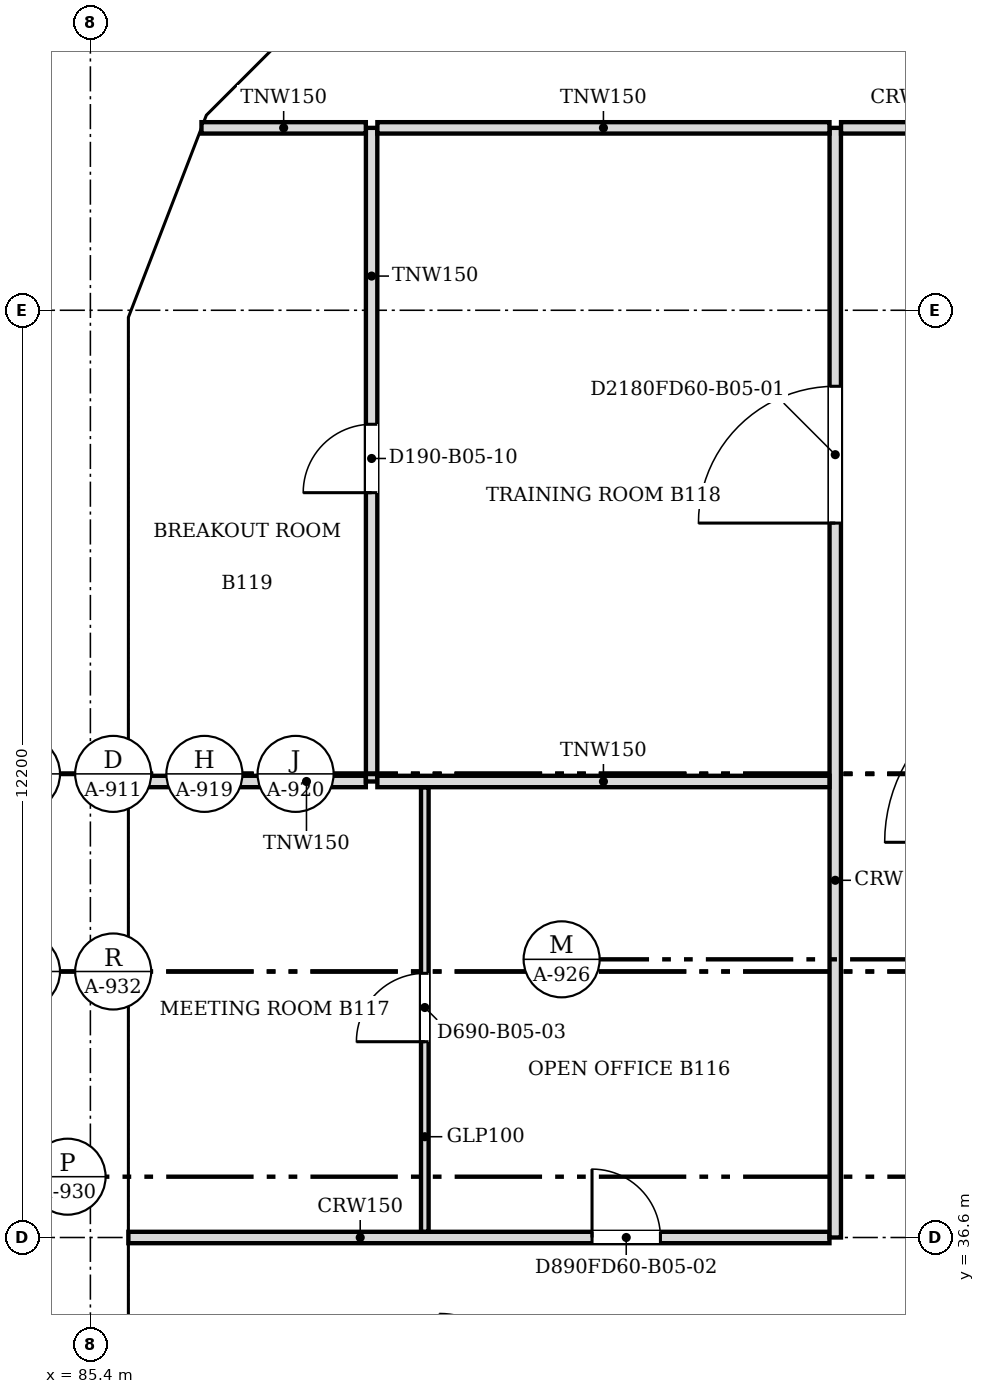
"""IFC4 building model, lengths in metres.
Left out: names, types, materials, properties, quantities, classifications, styles, units other than length and angle.
Written with IfcOpenShell. Run it as: python <this file> out.ifc"""

import sys

from ifc_helpers import new_model, si_unit, direction, frame, frame_2d, origin, place, context, subcontext, project, spatial, polyline, rectangle, outline, extrude, faceted_brep, source, transform, mapped, element, fill, save


model = new_model("IFC4")
c1 = context("Model", 3, precision=1e-05, world=origin(), true_north=direction((0.0, 1.0)))
c2 = subcontext(c1, "Body", "Model", "MODEL_VIEW")
j1 = project(units=[si_unit("LENGTHUNIT", "METRE"), si_unit("PLANEANGLEUNIT", "RADIAN")], contexts=[c1])
p1 = place(None, origin())
s1 = spatial("IfcSite", under=j1, at=p1, CompositionType="ELEMENT")
p2 = place(p1, origin())
s2 = spatial("IfcBuilding", under=s1, at=p2, CompositionType="ELEMENT")
p3 = place(p2, frame((0.0, 0.0, 52.4)))
s3 = spatial("IfcBuildingStorey", under=s2, at=p3, CompositionType="ELEMENT", Elevation=52.4)
m1 = source(origin(), c2, "Body", "Brep", [
    faceted_brep([(0.053, -0.25, 0.0), (2.997, -0.25, 3.8), (0.053, -0.25, 7.6), (0.0, -0.25, 7.532), (0.0, -0.25, 0.068), (0.106, 0.25, 7.531), (2.944, 0.25, 3.868), (2.944, 0.25, 3.732), (0.106, 0.25, 0.068), (2.997, 0.0, 3.8), (0.053, 0.0, 0.0), (0.053, 0.0, 7.6)], [[[0, 1, 2, 3, 4]], [[5, 6, 7, 8]], [[8, 7, 9, 1, 0, 10]], [[6, 5, 11, 2, 1, 9]], [[3, 2, 11]], [[10, 0, 4]], [[8, 10, 4, 3, 11, 5]], [[9, 7, 6]]]),
])
p4 = place(p3, frame((88.831, 53.625, -3.8), z_axis=(0.0, 0.0, 1.0), x_axis=(-0.707147509625, -0.707066050402, 0.0)))
e1 = element("IfcWall", 1, at=p4, inside=s3, PredefinedType="SOLIDWALL", context=c2, shape_type="MappedRepresentation", body=[
    mapped(m1, transform((0.0, 0.0, 0.0), scale=1.0)),
])
m2 = source(origin(), c2, "Body", "SweptSolid", [
    extrude(outline(polyline([(0.253, 0.666), (2.681, 3.8), (0.253, 6.934), (0.253, 0.666)])), frame((0.0, 0.26, 0.0), z_axis=(0.0, -1.0, 0.0), x_axis=(1.0, 0.0, 0.0)), (0.0, 0.0, 1.0), 0.52),
])
p5 = place(p4, origin())
e2 = element("IfcOpeningElement", 2, at=p5, cuts=e1, PredefinedType="OPENING", context=c2, shape_type="MappedRepresentation", body=[
    mapped(m2, transform((0.0, 0.0, 0.0), scale=1.0)),
])
m3 = source(origin(), c2, "Body", "Brep", [
    faceted_brep([(2.95, -0.25, 0.0), (2.997, -0.25, 0.059), (2.997, -0.25, 7.541), (2.95, -0.25, 7.6), (0.0, -0.25, 3.8), (0.053, 0.25, 3.868), (2.904, 0.25, 7.54), (2.904, 0.25, 0.06), (0.053, 0.25, 3.732), (2.95, 0.0, 0.0), (2.95, 0.0, 7.6), (0.0, 0.0, 3.8)], [[[0, 1, 2, 3, 4]], [[5, 6, 7, 8]], [[1, 0, 9]], [[10, 3, 2]], [[6, 5, 11, 4, 3, 10]], [[8, 7, 9, 0, 4, 11]], [[8, 11, 5]], [[1, 9, 7, 6, 10, 2]]]),
])
p6 = place(p3, frame((86.712, 51.506, -3.8), z_axis=(0.0, 0.0, 1.0), x_axis=(-0.359874094142, -0.933000876937, 0.0)))
e3 = element("IfcWall", 3, at=p6, inside=s3, PredefinedType="SOLIDWALL", context=c2, shape_type="MappedRepresentation", body=[
    mapped(m3, transform((0.0, 0.0, 0.0), scale=1.0)),
])
m4 = source(origin(), c2, "Body", "SweptSolid", [
    extrude(outline(polyline([(2.75, 6.935), (0.316, 3.8), (2.75, 0.665), (2.75, 6.935)])), frame((0.0, 0.26, 0.0), z_axis=(0.0, -1.0, 0.0), x_axis=(1.0, 0.0, 0.0)), (0.0, 0.0, 1.0), 0.52),
])
p7 = place(p6, origin())
e4 = element("IfcOpeningElement", 4, at=p7, cuts=e3, PredefinedType="OPENING", context=c2, shape_type="MappedRepresentation", body=[
    mapped(m4, transform((0.0, 0.0, 0.0), scale=1.0)),
])
m5 = source(origin(), c2, "Body", "Brep", [
    faceted_brep([(0.047, -0.25, 0.0), (3.05, -0.25, 3.8), (0.047, -0.25, 7.6), (0.0, -0.25, 7.54), (0.0, -0.25, 0.06), (0.093, 0.25, 7.541), (3.05, 0.25, 3.8), (0.093, 0.25, 0.059), (0.047, 0.0, 0.0), (0.047, 0.0, 7.6)], [[[0, 1, 2, 3, 4]], [[5, 6, 7]], [[7, 6, 1, 0, 8]], [[6, 5, 9, 2, 1]], [[3, 2, 9]], [[8, 0, 4]], [[7, 8, 4, 3, 9, 5]]]),
])
p8 = place(p3, frame((85.65, 48.8, -3.8), z_axis=(0.0, 0.0, 1.0), x_axis=(0.0, -1.0, 0.0)))
e5 = element("IfcWall", 5, at=p8, inside=s3, PredefinedType="SOLIDWALL", context=c2, shape_type="MappedRepresentation", body=[
    mapped(m5, transform((0.0, 0.0, 0.0), scale=1.0)),
])
m6 = source(origin(), c2, "Body", "SweptSolid", [
    extrude(outline(polyline([(0.247, 0.656), (2.731, 3.8), (0.247, 6.944), (0.247, 0.656)])), frame((0.0, 0.26, 0.0), z_axis=(0.0, -1.0, 0.0), x_axis=(1.0, 0.0, 0.0)), (0.0, 0.0, 1.0), 0.52),
])
p9 = place(p8, origin())
e6 = element("IfcOpeningElement", 6, at=p9, cuts=e5, PredefinedType="OPENING", context=c2, shape_type="MappedRepresentation", body=[
    mapped(m6, transform((0.0, 0.0, 0.0), scale=1.0)),
])
m7 = source(origin(), c2, "Body", "SweptSolid", [
    extrude(outline(polyline([(3.05, 0.0), (6.1, 3.8), (3.05, 7.6), (0.0, 3.8), (3.05, 0.0)])), frame((0.0, 0.25, 0.0), z_axis=(0.0, -1.0, 0.0), x_axis=(1.0, 0.0, 0.0)), (0.0, 0.0, 1.0), 0.5),
])
p10 = place(p3, frame((85.65, 45.75, -3.8), z_axis=(0.0, 0.0, 1.0), x_axis=(0.0, -1.0, 0.0)))
e7 = element("IfcWall", 7, at=p10, inside=s3, PredefinedType="SOLIDWALL", context=c2, shape_type="MappedRepresentation", body=[
    mapped(m7, transform((0.0, 0.0, 0.0), scale=1.0)),
])
m8 = source(origin(), c2, "Body", "SweptSolid", [
    extrude(outline(polyline([(3.05, 0.399), (5.78, 3.8), (3.05, 7.2), (0.321, 3.8), (3.05, 0.399)])), frame((0.0, 0.26, 0.0), z_axis=(0.0, -1.0, 0.0), x_axis=(1.0, 0.0, 0.0)), (0.0, 0.0, 1.0), 0.52),
])
p11 = place(p10, origin())
e8 = element("IfcOpeningElement", 8, at=p11, cuts=e7, PredefinedType="OPENING", context=c2, shape_type="MappedRepresentation", body=[
    mapped(m8, transform((0.0, 0.0, 0.0), scale=1.0)),
])
m9 = source(origin(), c2, "Body", "Brep", [
    faceted_brep([(3.05, -0.25, 0.0), (6.1, -0.25, 3.8), (6.1, -0.25, 3.8), (3.05, -0.25, 7.6), (0.0, -0.25, 3.8), (0.0, 0.25, 3.8), (3.05, 0.25, 7.6), (6.1, 0.25, 3.8), (6.1, 0.25, 3.8), (3.05, 0.25, 0.0)], [[[0, 1, 2, 3, 4]], [[5, 6, 7, 8, 9]], [[9, 8, 1, 0]], [[7, 6, 3, 2]], [[6, 5, 4, 3]], [[5, 9, 0, 4]], [[1, 8, 7, 2]]]),
])
p12 = place(p3, frame((85.65, 39.65, -3.8), z_axis=(0.0, 0.0, 1.0), x_axis=(0.0, -1.0, 0.0)))
e9 = element("IfcWall", 9, at=p12, inside=s3, PredefinedType="SOLIDWALL", context=c2, shape_type="MappedRepresentation", body=[
    mapped(m9, transform((0.0, 0.0, 0.0), scale=1.0)),
])
p13 = place(p12, origin())
e10 = element("IfcOpeningElement", 10, at=p13, cuts=e9, PredefinedType="OPENING", context=c2, shape_type="MappedRepresentation", body=[
    mapped(m8, transform((0.0, 0.0, 0.0), scale=1.0)),
])
p14 = place(p2, frame((0.0, 0.0, 56.2)))
s4 = spatial("IfcBuildingStorey", under=s2, at=p14, CompositionType="ELEMENT", Elevation=56.2)
m10 = source(origin(), c2, "Body", "Brep", [
    faceted_brep([(2.944, -0.25, 0.0), (2.997, -0.25, 0.068), (2.997, -0.25, 7.532), (2.944, -0.25, 7.6), (0.0, -0.25, 3.8), (0.053, 0.25, 3.868), (2.891, 0.25, 7.532), (2.891, 0.25, 0.068), (0.053, 0.25, 3.732), (2.944, 0.0, 0.0), (2.944, 0.0, 7.6), (0.0, 0.0, 3.8)], [[[0, 1, 2, 3, 4]], [[5, 6, 7, 8]], [[1, 0, 9]], [[10, 3, 2]], [[6, 5, 11, 4, 3, 10]], [[8, 7, 9, 0, 4, 11]], [[8, 11, 5]], [[1, 9, 7, 6, 10, 2]]]),
])
p15 = place(p14, frame((88.794, 53.588, -3.8), z_axis=(0.0, 0.0, 1.0), x_axis=(-0.707066050402, -0.707147509625, 0.0)))
e11 = element("IfcWall", 11, at=p15, inside=s4, PredefinedType="SOLIDWALL", context=c2, shape_type="MappedRepresentation", body=[
    mapped(m10, transform((0.0, 0.0, 0.0), scale=1.0)),
])
m11 = source(origin(), c2, "Body", "SweptSolid", [
    extrude(outline(polyline([(2.744, 6.934), (0.316, 3.8), (2.744, 0.667), (2.744, 6.934)])), frame((0.0, 0.26, 0.0), z_axis=(0.0, -1.0, 0.0), x_axis=(1.0, 0.0, 0.0)), (0.0, 0.0, 1.0), 0.52),
])
p16 = place(p15, origin())
e12 = element("IfcOpeningElement", 12, at=p16, cuts=e11, PredefinedType="OPENING", context=c2, shape_type="MappedRepresentation", body=[
    mapped(m11, transform((0.0, 0.0, 0.0), scale=1.0)),
])
m12 = source(origin(), c2, "Body", "Brep", [
    faceted_brep([(0.053, -0.25, 0.0), (3.003, -0.25, 3.8), (0.053, -0.25, 7.6), (0.0, -0.25, 7.532), (0.0, -0.25, 0.068), (0.106, 0.25, 7.532), (2.957, 0.25, 3.86), (2.957, 0.25, 3.74), (0.106, 0.25, 0.068), (3.003, 0.0, 3.8), (0.053, 0.0, 0.0), (0.053, 0.0, 7.6)], [[[0, 1, 2, 3, 4]], [[5, 6, 7, 8]], [[8, 7, 9, 1, 0, 10]], [[6, 5, 11, 2, 1, 9]], [[3, 2, 11]], [[10, 0, 4]], [[8, 10, 4, 3, 11, 5]], [[9, 7, 6]]]),
])
p17 = place(p14, frame((86.731, 51.556, -3.8), z_axis=(0.0, 0.0, 1.0), x_axis=(-0.359855894603, -0.933007896601, 0.0)))
e13 = element("IfcWall", 13, at=p17, inside=s4, PredefinedType="SOLIDWALL", context=c2, shape_type="MappedRepresentation", body=[
    mapped(m12, transform((0.0, 0.0, 0.0), scale=1.0)),
])
m13 = source(origin(), c2, "Body", "SweptSolid", [
    extrude(outline(polyline([(0.253, 0.665), (2.687, 3.8), (0.253, 6.935), (0.253, 0.665)])), frame((0.0, 0.26, 0.0), z_axis=(0.0, -1.0, 0.0), x_axis=(1.0, 0.0, 0.0)), (0.0, 0.0, 1.0), 0.52),
])
p18 = place(p17, origin())
e14 = element("IfcOpeningElement", 14, at=p18, cuts=e13, PredefinedType="OPENING", context=c2, shape_type="MappedRepresentation", body=[
    mapped(m13, transform((0.0, 0.0, 0.0), scale=1.0)),
])
m14 = source(origin(), c2, "Body", "Brep", [
    faceted_brep([(3.003, -0.25, 0.0), (6.053, -0.25, 3.8), (3.003, -0.25, 7.6), (0.0, -0.25, 3.8), (0.047, 0.25, 3.859), (3.003, 0.25, 7.6), (6.053, 0.25, 3.8), (3.003, 0.25, 0.0), (0.047, 0.25, 3.741), (0.0, 0.0, 3.8)], [[[0, 1, 2, 3]], [[4, 5, 6, 7, 8]], [[7, 6, 1, 0]], [[6, 5, 2, 1]], [[5, 4, 9, 3, 2]], [[8, 7, 0, 3, 9]], [[8, 9, 4]]]),
])
p19 = place(p14, frame((85.65, 48.753, -3.8), z_axis=(0.0, 0.0, 1.0), x_axis=(0.0, -1.0, 0.0)))
e15 = element("IfcWall", 15, at=p19, inside=s4, PredefinedType="SOLIDWALL", context=c2, shape_type="MappedRepresentation", body=[
    mapped(m14, transform((0.0, 0.0, 0.0), scale=1.0)),
])
m15 = source(origin(), c2, "Body", "SweptSolid", [
    extrude(outline(polyline([(3.005, 0.401), (5.733, 3.8), (3.005, 7.199), (0.319, 3.8), (3.005, 0.401)])), frame((0.0, 0.26, 0.0), z_axis=(0.0, -1.0, 0.0), x_axis=(1.0, 0.0, 0.0)), (0.0, 0.0, 1.0), 0.52),
])
p20 = place(p19, origin())
e16 = element("IfcOpeningElement", 16, at=p20, cuts=e15, PredefinedType="OPENING", context=c2, shape_type="MappedRepresentation", body=[
    mapped(m15, transform((0.0, 0.0, 0.0), scale=1.0)),
])
m16 = source(origin(), c2, "Body", "Brep", [
    faceted_brep([(3.05, -0.25, 0.0), (6.1, -0.25, 3.8), (6.1, -0.25, 3.8), (3.05, -0.25, 7.6), (0.0, -0.25, 3.8), (0.0, 0.25, 3.8), (3.05, 0.25, 7.6), (6.1, 0.25, 3.8), (6.1, 0.25, 3.8), (3.05, 0.25, 0.0)], [[[0, 1, 2, 3, 4]], [[5, 6, 7, 8, 9]], [[9, 8, 1, 0]], [[7, 6, 3, 2]], [[6, 5, 4, 3]], [[5, 9, 0, 4]], [[1, 8, 7, 2]]]),
])
p21 = place(p14, frame((85.65, 42.7, -3.8), z_axis=(0.0, 0.0, 1.0), x_axis=(0.0, -1.0, 0.0)))
e17 = element("IfcWall", 17, at=p21, inside=s4, PredefinedType="SOLIDWALL", context=c2, shape_type="MappedRepresentation", body=[
    mapped(m16, transform((0.0, 0.0, 0.0), scale=1.0)),
])
m17 = source(origin(), c2, "Body", "SweptSolid", [
    extrude(outline(polyline([(3.05, 0.399), (5.78, 3.8), (3.05, 7.201), (0.321, 3.8), (3.05, 0.399)])), frame((0.0, 0.26, 0.0), z_axis=(0.0, -1.0, 0.0), x_axis=(1.0, 0.0, 0.0)), (0.0, 0.0, 1.0), 0.52),
])
p22 = place(p21, origin())
e18 = element("IfcOpeningElement", 18, at=p22, cuts=e17, PredefinedType="OPENING", context=c2, shape_type="MappedRepresentation", body=[
    mapped(m17, transform((0.0, 0.0, 0.0), scale=1.0)),
])
m18 = source(origin(), c2, "Body", "SweptSolid", [
    extrude(outline(polyline([(3.05, 0.0), (6.1, 3.8), (3.05, 7.6), (0.0, 3.8), (3.05, 0.0)])), frame((0.0, 0.25, 0.0), z_axis=(0.0, -1.0, 0.0), x_axis=(1.0, 0.0, 0.0)), (0.0, 0.0, 1.0), 0.5),
])
p23 = place(p14, frame((85.65, 36.6, -3.8), z_axis=(0.0, 0.0, 1.0), x_axis=(0.0, -1.0, 0.0)))
e19 = element("IfcWall", 19, at=p23, inside=s4, PredefinedType="SOLIDWALL", context=c2, shape_type="MappedRepresentation", body=[
    mapped(m18, transform((0.0, 0.0, 0.0), scale=1.0)),
])
p24 = place(p23, origin())
e20 = element("IfcOpeningElement", 20, at=p24, cuts=e19, PredefinedType="OPENING", context=c2, shape_type="MappedRepresentation", body=[
    mapped(m17, transform((0.0, 0.0, 0.0), scale=1.0)),
])
p25 = place(p3, frame((85.9, 36.6, 0.0), z_axis=(0.0, 0.0, 1.0), x_axis=(1.0, 0.0, 0.0)))
e21 = element("IfcWall", 21, at=p25, inside=s3, PredefinedType="PARTITIONING", context=c2, shape_type="SweptSolid", body=[
    extrude(rectangle(XDim=9.224, YDim=0.15, at=frame_2d((4.612, 0.0))), origin(), (0.0, 0.0, 1.0), 3.067),
])
m19 = source(origin(), c2, "Body", "SweptSolid", [
    extrude(rectangle(XDim=0.9, YDim=2.1, at=frame_2d((0.45, 1.05))), frame((0.0, 0.085, 0.0), z_axis=(0.0, -1.0, 0.0), x_axis=(1.0, 0.0, 0.0)), (0.0, 0.0, 1.0), 0.17),
])
p26 = place(p25, frame((6.1, 0.0, 0.0)))
e22 = element("IfcOpeningElement", 22, at=p26, cuts=e21, PredefinedType="OPENING", context=c2, shape_type="MappedRepresentation", body=[
    mapped(m19, transform((0.0, 0.0, 0.0), scale=1.0)),
])
p27 = place(p3, frame((95.2, 36.6, 0.0), z_axis=(0.0, 0.0, 1.0), x_axis=(0.0, 1.0, 0.0)))
e23 = element("IfcWall", 23, at=p27, inside=s3, PredefinedType="PARTITIONING", context=c2, shape_type="SweptSolid", body=[
    extrude(rectangle(XDim=14.6, YDim=0.15, at=frame_2d((7.3, 0.0))), origin(), (0.0, 0.0, 1.0), 3.067),
])
m20 = source(origin(), c2, "Body", "SweptSolid", [
    extrude(rectangle(XDim=1.8, YDim=2.1, at=frame_2d((0.9, 1.05))), frame((0.0, 0.085, 0.0), z_axis=(0.0, -1.0, 0.0), x_axis=(1.0, 0.0, 0.0)), (0.0, 0.0, 1.0), 0.17),
])
p28 = place(p27, frame((9.4, 0.0, 0.0)))
e24 = element("IfcOpeningElement", 24, at=p28, cuts=e23, PredefinedType="OPENING", context=c2, shape_type="MappedRepresentation", body=[
    mapped(m20, transform((0.0, 0.0, 0.0), scale=1.0)),
])
p29 = place(p3, frame((89.8, 36.676, 0.0), z_axis=(0.0, 0.0, 1.0), x_axis=(0.0, 1.0, 0.0)))
e25 = element("IfcWall", 25, at=p29, inside=s3, PredefinedType="PARTITIONING", context=c2, shape_type="SweptSolid", body=[
    extrude(rectangle(XDim=5.848, YDim=0.1, at=frame_2d((2.924, 0.0))), origin(), (0.0, 0.0, 1.0), 3.067),
])
m21 = source(origin(), c2, "Body", "SweptSolid", [
    extrude(rectangle(XDim=0.9, YDim=2.1, at=frame_2d((0.45, 1.05))), frame((0.0, 0.06, 0.0), z_axis=(0.0, -1.0, 0.0), x_axis=(1.0, 0.0, 0.0)), (0.0, 0.0, 1.0), 0.12),
])
p30 = place(p29, frame((2.5, 0.0, 0.0)))
e26 = element("IfcOpeningElement", 26, at=p30, cuts=e25, PredefinedType="OPENING", context=c2, shape_type="MappedRepresentation", body=[
    mapped(m21, transform((0.0, 0.0, 0.0), scale=1.0)),
])
p31 = place(p3, frame((85.9, 42.6, 0.0), z_axis=(0.0, 0.0, 1.0), x_axis=(1.0, 0.0, 0.0)))
e27 = element("IfcWall", 27, at=p31, inside=s3, PredefinedType="PARTITIONING", context=c2, shape_type="SweptSolid", body=[
    extrude(rectangle(XDim=3.124, YDim=0.15, at=frame_2d((1.562, 0.0))), origin(), (0.0, 0.0, 1.0), 3.067),
])
p32 = place(p3, frame((89.1, 42.6, 0.0), z_axis=(0.0, 0.0, 1.0), x_axis=(0.0, 1.0, 0.0)))
e28 = element("IfcWall", 28, at=p32, inside=s3, PredefinedType="PARTITIONING", context=c2, shape_type="SweptSolid", body=[
    extrude(rectangle(XDim=8.6, YDim=0.15, at=frame_2d((4.3, 0.0))), origin(), (0.0, 0.0, 1.0), 3.067),
])
p33 = place(p32, frame((3.8, 0.0, 0.0)))
e29 = element("IfcOpeningElement", 29, at=p33, cuts=e28, PredefinedType="OPENING", context=c2, shape_type="MappedRepresentation", body=[
    mapped(m19, transform((0.0, 0.0, 0.0), scale=1.0)),
])
p34 = place(p3, frame((89.176, 42.6, 0.0), z_axis=(0.0, 0.0, 1.0), x_axis=(1.0, 0.0, 0.0)))
e30 = element("IfcWall", 30, at=p34, inside=s3, PredefinedType="PARTITIONING", context=c2, shape_type="SweptSolid", body=[
    extrude(rectangle(XDim=5.948, YDim=0.15, at=frame_2d((2.974, 0.0))), origin(), (0.0, 0.0, 1.0), 3.067),
])
p35 = place(p3, frame((86.862, 51.2, 0.0), z_axis=(0.0, 0.0, 1.0), x_axis=(1.0, 0.0, 0.0)))
e31 = element("IfcWall", 31, at=p35, inside=s3, PredefinedType="PARTITIONING", context=c2, shape_type="SweptSolid", body=[
    extrude(rectangle(XDim=2.162, YDim=0.15, at=frame_2d((1.081, 0.0))), origin(), (0.0, 0.0, 1.0), 3.067),
])
p36 = place(p3, frame((89.176, 51.2, 0.0), z_axis=(0.0, 0.0, 1.0), x_axis=(1.0, 0.0, 0.0)))
e32 = element("IfcWall", 32, at=p36, inside=s3, PredefinedType="PARTITIONING", context=c2, shape_type="SweptSolid", body=[
    extrude(rectangle(XDim=5.948, YDim=0.15, at=frame_2d((2.974, 0.0))), origin(), (0.0, 0.0, 1.0), 3.067),
])
p37 = place(p3, frame((95.276, 51.2, 0.0), z_axis=(0.0, 0.0, 1.0), x_axis=(1.0, 0.0, 0.0)))
e33 = element("IfcWall", 33, at=p37, inside=s3, PredefinedType="PARTITIONING", context=c2, shape_type="SweptSolid", body=[
    extrude(rectangle(XDim=4.724, YDim=0.15, at=frame_2d((2.362, 0.0))), origin(), (0.0, 0.0, 1.0), 3.067),
])
m22 = source(origin(), c2, "Body", "SweptSolid", [
    extrude(rectangle(XDim=1.0, YDim=2.1, at=frame_2d((0.5, 1.05))), frame((0.0, 0.085, 0.0), z_axis=(0.0, -1.0, 0.0), x_axis=(1.0, 0.0, 0.0)), (0.0, 0.0, 1.0), 0.17),
])
p38 = place(p37, frame((1.9, 0.0, 0.0)))
e34 = element("IfcOpeningElement", 34, at=p38, cuts=e33, PredefinedType="OPENING", context=c2, shape_type="MappedRepresentation", body=[
    mapped(m22, transform((0.0, 0.0, 0.0), scale=1.0)),
])
m23 = source(origin(), c2, "Body", "SweptSolid", [
    extrude(rectangle(XDim=0.9, YDim=2.1, at=frame_2d((0.45, 1.05))), frame((0.0, 0.025, 0.0), z_axis=(0.0, -1.0, 0.0), x_axis=(1.0, 0.0, 0.0)), (0.0, 0.0, 1.0), 0.05),
])
p39 = place(p30, origin())
e35 = element("IfcDoor", 35, at=p39, inside=s3, OperationType="SINGLE_SWING_LEFT", PredefinedType="DOOR", context=c2, shape_type="MappedRepresentation", body=[
    mapped(m23, transform((0.0, 0.0, 0.0), scale=1.0)),
])
fill(e26, e35)
m24 = source(origin(), c2, "Body", "SweptSolid", [
    extrude(rectangle(XDim=1.8, YDim=2.1, at=frame_2d((0.9, 1.05))), frame((0.0, 0.025, 0.0), z_axis=(0.0, -1.0, 0.0), x_axis=(1.0, 0.0, 0.0)), (0.0, 0.0, 1.0), 0.05),
])
p40 = place(p28, origin())
e36 = element("IfcDoor", 36, at=p40, inside=s3, OperationType="DOUBLE_DOOR_SINGLE_SWING", PredefinedType="DOOR", context=c2, shape_type="MappedRepresentation", body=[
    mapped(m24, transform((0.0, 0.0, 0.0), scale=1.0)),
])
fill(e24, e36)
p41 = place(p33, origin())
e37 = element("IfcDoor", 37, at=p41, inside=s3, OperationType="SINGLE_SWING_LEFT", PredefinedType="DOOR", context=c2, shape_type="MappedRepresentation", body=[
    mapped(m23, transform((0.0, 0.0, 0.0), scale=1.0)),
])
fill(e29, e37)
p42 = place(p26, origin())
e38 = element("IfcDoor", 38, at=p42, inside=s3, OperationType="SINGLE_SWING_LEFT", PredefinedType="DOOR", context=c2, shape_type="MappedRepresentation", body=[
    mapped(m23, transform((0.0, 0.0, 0.0), scale=1.0)),
])
fill(e22, e38)
save(model, sys.argv[1])
